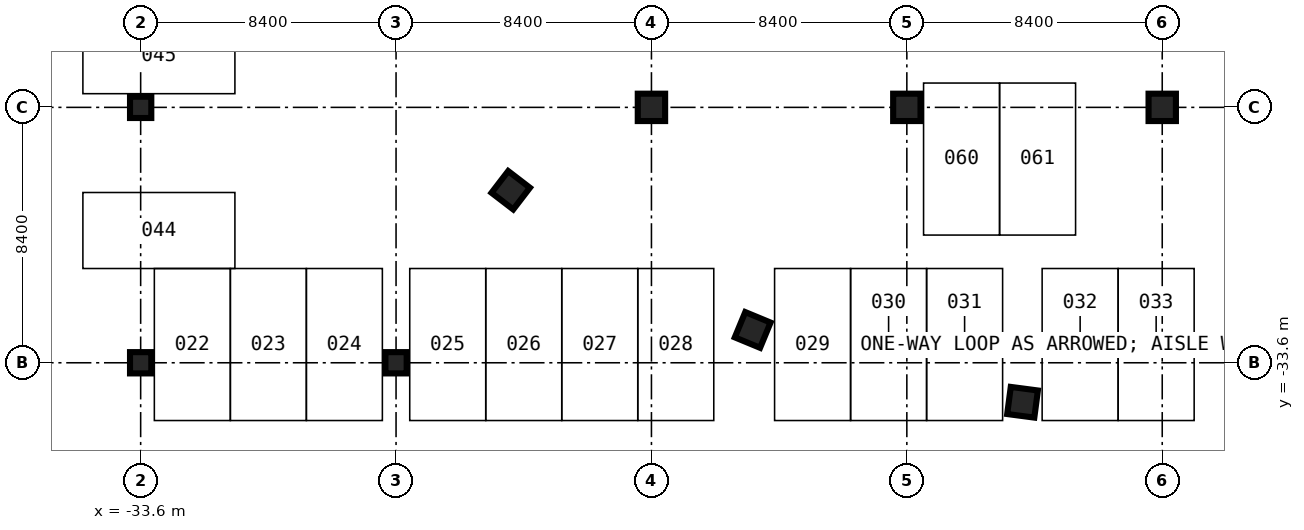
"""IFC4 building model, lengths in metres.
Left out: names, types, materials, properties, quantities, classifications, styles, units other than length and angle.
Written with IfcOpenShell. Run it as: python <this file> out.ifc"""

import sys

from ifc_helpers import new_model, si_unit, direction, frame, origin, origin_2d, place, context, subcontext, project, spatial, rectangle, extrude, element, save


model = new_model("IFC4")
c1 = context("Model", 3, precision=1e-05, world=origin(), true_north=direction((0.0, 1.0)))
c2 = subcontext(c1, "Body", "Model", "MODEL_VIEW")
j1 = project(units=[si_unit("LENGTHUNIT", "METRE"), si_unit("PLANEANGLEUNIT", "RADIAN")], contexts=[c1])
p1 = place(None, origin())
s1 = spatial("IfcSite", under=j1, at=p1, CompositionType="ELEMENT")
p2 = place(p1, origin())
s2 = spatial("IfcBuilding", under=s1, at=p2, CompositionType="ELEMENT")
p3 = place(p2, frame((0.0, 0.0, -13.5)))
s3 = spatial("IfcBuildingStorey", under=s2, at=p3, CompositionType="ELEMENT", Elevation=-13.5)
for number, where, z_axis, x_axis in (
    (1, (-16.8, -25.2, 0.0), (0.0, 0.0, 1.0), (1.0, 0.0, 0.0)),
    (2, (-8.4, -25.2, 0.0), (0.0, 0.0, 1.0), (1.0, 0.0, 0.0)),
    (3, (0.0, -25.2, 0.0), (0.0, 0.0, 1.0), (1.0, 0.0, 0.0)),
):
    element("IfcColumn", number, at=place(p3, frame(where, z_axis=z_axis, x_axis=x_axis)), inside=s3, PredefinedType="COLUMN", context=c2, shape_type="SweptSolid", body=[
        extrude(rectangle(XDim=0.9, YDim=0.9, at=origin_2d()), origin(), (0.0, 0.0, 1.0), 4.5),
    ])
for number, where, z_axis, x_axis in (
    (4, (-33.6, -33.6, 0.0), (0.0, 0.0, 1.0), (1.0, 0.0, 0.0)),
    (5, (-33.6, -25.2, 0.0), (0.0, 0.0, 1.0), (1.0, 0.0, 0.0)),
    (6, (-25.2, -33.6, 0.0), (0.0, 0.0, 1.0), (1.0, 0.0, 0.0)),
):
    element("IfcColumn", number, at=place(p3, frame(where, z_axis=z_axis, x_axis=x_axis)), inside=s3, PredefinedType="COLUMN", context=c2, shape_type="SweptSolid", body=[
        extrude(rectangle(XDim=0.7, YDim=0.7, at=origin_2d()), origin(), (0.0, 0.0, 1.0), 4.5),
    ])
for number, where, z_axis, x_axis in (
    (7, (-21.428, -27.926, 0.0), (0.0, 0.0, 1.0), (-0.609, -0.793, 0.0)),
    (8, (-13.47, -32.521, 0.0), (0.0, 0.0, 1.0), (-0.383, -0.924, 0.0)),
    (9, (-4.594, -34.899, 0.0), (0.0, 0.0, 1.0), (-0.131, -0.991, 0.0)),
):
    element("IfcColumn", number, at=place(p3, frame(where, z_axis=z_axis, x_axis=x_axis)), inside=s3, PredefinedType="COLUMN", context=c2, shape_type="SweptSolid", body=[
        extrude(rectangle(XDim=0.9, YDim=0.9, at=origin_2d()), origin(), (0.0, 0.0, 1.0), 4.5),
    ])
save(model, sys.argv[1])
